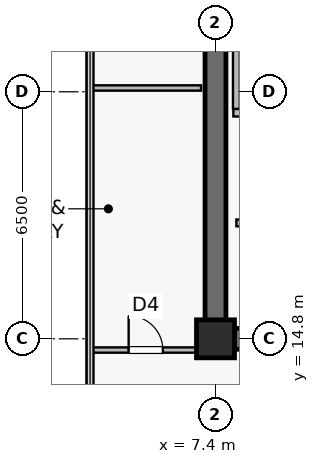
"""IFC4 building model, lengths in metres.
Left out: names, types, materials, properties, quantities, classifications, styles, units other than length and angle.
Written with IfcOpenShell. Run it as: python <this file> out.ifc"""

import sys

from ifc_helpers import new_model, si_unit, direction, frame, frame_2d, origin, origin_2d, place, context, subcontext, project, spatial, rectangle, extrude, source, transform, mapped, element, fill, save


model = new_model("IFC4")
c1 = context("Model", 3, precision=1e-05, world=origin(), true_north=direction((0.0, 1.0)))
c2 = subcontext(c1, "Body", "Model", "MODEL_VIEW")
j1 = project(units=[si_unit("LENGTHUNIT", "METRE"), si_unit("PLANEANGLEUNIT", "RADIAN")], contexts=[c1])
p1 = place(None, origin())
s1 = spatial("IfcSite", under=j1, at=p1, CompositionType="ELEMENT")
p2 = place(p1, origin())
s2 = spatial("IfcBuilding", under=s1, at=p2, CompositionType="ELEMENT")
p3 = place(p2, frame((0.0, 0.0, 258.8)))
s3 = spatial("IfcBuildingStorey", under=s2, at=p3, CompositionType="ELEMENT", Elevation=258.8)
p4 = place(p3, frame((7.125, 14.8, 0.0), z_axis=(0.0, 0.0, 1.0), x_axis=(1.0, 0.0, 0.0)))
e1 = element("IfcWall", 1, at=p4, inside=s3, PredefinedType="SHEAR", context=c2, shape_type="SweptSolid", body=[
    extrude(rectangle(XDim=15.35, YDim=0.55, at=frame_2d((7.675, 0.0))), origin(), (0.0, 0.0, 1.0), 3.8),
])
p5 = place(p3, frame((7.4, 15.075, 0.0), z_axis=(0.0, 0.0, 1.0), x_axis=(0.0, 1.0, 0.0)))
e2 = element("IfcWall", 2, at=p5, inside=s3, PredefinedType="SHEAR", context=c2, shape_type="SweptSolid", body=[
    extrude(rectangle(XDim=18.45, YDim=0.55, at=frame_2d((9.225, 0.0))), origin(), (0.0, 0.0, 1.0), 3.8),
])
m1 = source(origin(), c2, "Body", "SweptSolid", [
    extrude(rectangle(XDim=1.0, YDim=1.0, at=origin_2d()), origin(), (0.0, 0.0, 1.0), 4.1),
])
p6 = place(p3, frame((7.4, 14.8, 0.0), z_axis=(0.0, 0.0, 1.0), x_axis=(1.0, 0.0, 0.0)))
e3 = element("IfcColumn", 3, at=p6, inside=s3, PredefinedType="COLUMN", context=c2, shape_type="MappedRepresentation", body=[
    mapped(m1, transform((0.0, 0.0, 0.0), scale=1.0)),
])
p7 = place(p3, frame((7.87, 20.75, 0.0), z_axis=(0.0, 0.0, 1.0), x_axis=(1.0, 0.0, 0.0)))
e4 = element("IfcWall", 4, at=p7, inside=s3, PredefinedType="SOLIDWALL", context=c2, shape_type="SweptSolid", body=[
    extrude(rectangle(XDim=2.26, YDim=0.2, at=frame_2d((1.13, 0.0))), origin(), (0.0, 0.0, 1.0), 3.8),
])
p8 = place(p7, frame((0.58, 0.0, 0.0)))
e5 = element("IfcOpeningElement", 5, at=p8, cuts=e4, PredefinedType="OPENING", context=c2, shape_type="SweptSolid", body=[
    extrude(rectangle(XDim=1.1, YDim=2.22, at=frame_2d((0.55, 1.11))), frame((0.0, 0.11, 0.0), z_axis=(0.0, -1.0, 0.0), x_axis=(1.0, 0.0, 0.0)), (0.0, 0.0, 1.0), 0.22),
])
p9 = place(p3, frame((7.95, 20.85, 0.0), z_axis=(0.0, 0.0, 1.0), x_axis=(0.0, 1.0, 0.0)))
e6 = element("IfcWall", 6, at=p9, inside=s3, PredefinedType="SOLIDWALL", context=c2, shape_type="SweptSolid", body=[
    extrude(rectangle(XDim=1.9, YDim=0.18, at=frame_2d((0.95, 0.0))), origin(), (0.0, 0.0, 1.0), 3.8),
])
p10 = place(p3, frame((7.95, 17.85, 0.0), z_axis=(0.0, 0.0, 1.0), x_axis=(1.0, 0.0, 0.0)))
e7 = element("IfcWall", 7, at=p10, inside=s3, PredefinedType="SOLIDWALL", context=c2, shape_type="SweptSolid", body=[
    extrude(rectangle(XDim=3.25, YDim=0.18, at=frame_2d((1.625, 0.0))), origin(), (0.0, 0.0, 1.0), 3.8),
])
p11 = place(p10, frame((1.15, 0.0, 0.0)))
e8 = element("IfcOpeningElement", 8, at=p11, cuts=e7, PredefinedType="OPENING", context=c2, shape_type="SweptSolid", body=[
    extrude(rectangle(XDim=0.95, YDim=2.15, at=frame_2d((0.475, 1.075))), frame((0.0, 0.1, 0.0), z_axis=(0.0, -1.0, 0.0), x_axis=(1.0, 0.0, 0.0)), (0.0, 0.0, 1.0), 0.2),
])
p12 = place(p3, frame((4.11, 21.4, 0.0), z_axis=(0.0, 0.0, 1.0), x_axis=(1.0, 0.0, 0.0)))
e9 = element("IfcWall", 9, at=p12, inside=s3, PredefinedType="PARTITIONING", context=c2, shape_type="SweptSolid", body=[
    extrude(rectangle(XDim=2.91, YDim=0.14, at=frame_2d((1.455, 0.0))), origin(), (0.0, 0.0, 1.0), 3.8),
])
p13 = place(p3, frame((4.11, 14.505, 0.0), z_axis=(0.0, 0.0, 1.0), x_axis=(1.0, 0.0, 0.0)))
e10 = element("IfcWall", 10, at=p13, inside=s3, PredefinedType="PARTITIONING", context=c2, shape_type="SweptSolid", body=[
    extrude(rectangle(XDim=2.91, YDim=0.14, at=frame_2d((1.455, 0.0))), origin(), (0.0, 0.0, 1.0), 3.8),
])
p14 = place(p13, frame((1.005, 0.0, 0.0)))
e11 = element("IfcOpeningElement", 11, at=p14, cuts=e10, PredefinedType="OPENING", context=c2, shape_type="SweptSolid", body=[
    extrude(rectangle(XDim=0.9, YDim=2.1, at=frame_2d((0.45, 1.05))), frame((0.0, 0.08, 0.0), z_axis=(0.0, -1.0, 0.0), x_axis=(1.0, 0.0, 0.0)), (0.0, 0.0, 1.0), 0.16),
])
m2 = source(origin(), c2, "Body", "SweptSolid", [
    extrude(rectangle(XDim=0.9, YDim=2.1, at=frame_2d((0.45, 1.05))), frame((0.0, 0.025, 0.0), z_axis=(0.0, -1.0, 0.0), x_axis=(1.0, 0.0, 0.0)), (0.0, 0.0, 1.0), 0.05),
])
p15 = place(p14, origin())
e12 = element("IfcDoor", 12, at=p15, inside=s3, OperationType="SINGLE_SWING_LEFT", PredefinedType="DOOR", context=c2, shape_type="MappedRepresentation", body=[
    mapped(m2, transform((0.0, 0.0, 0.0), scale=1.0)),
])
fill(e11, e12)
save(model, sys.argv[1])
